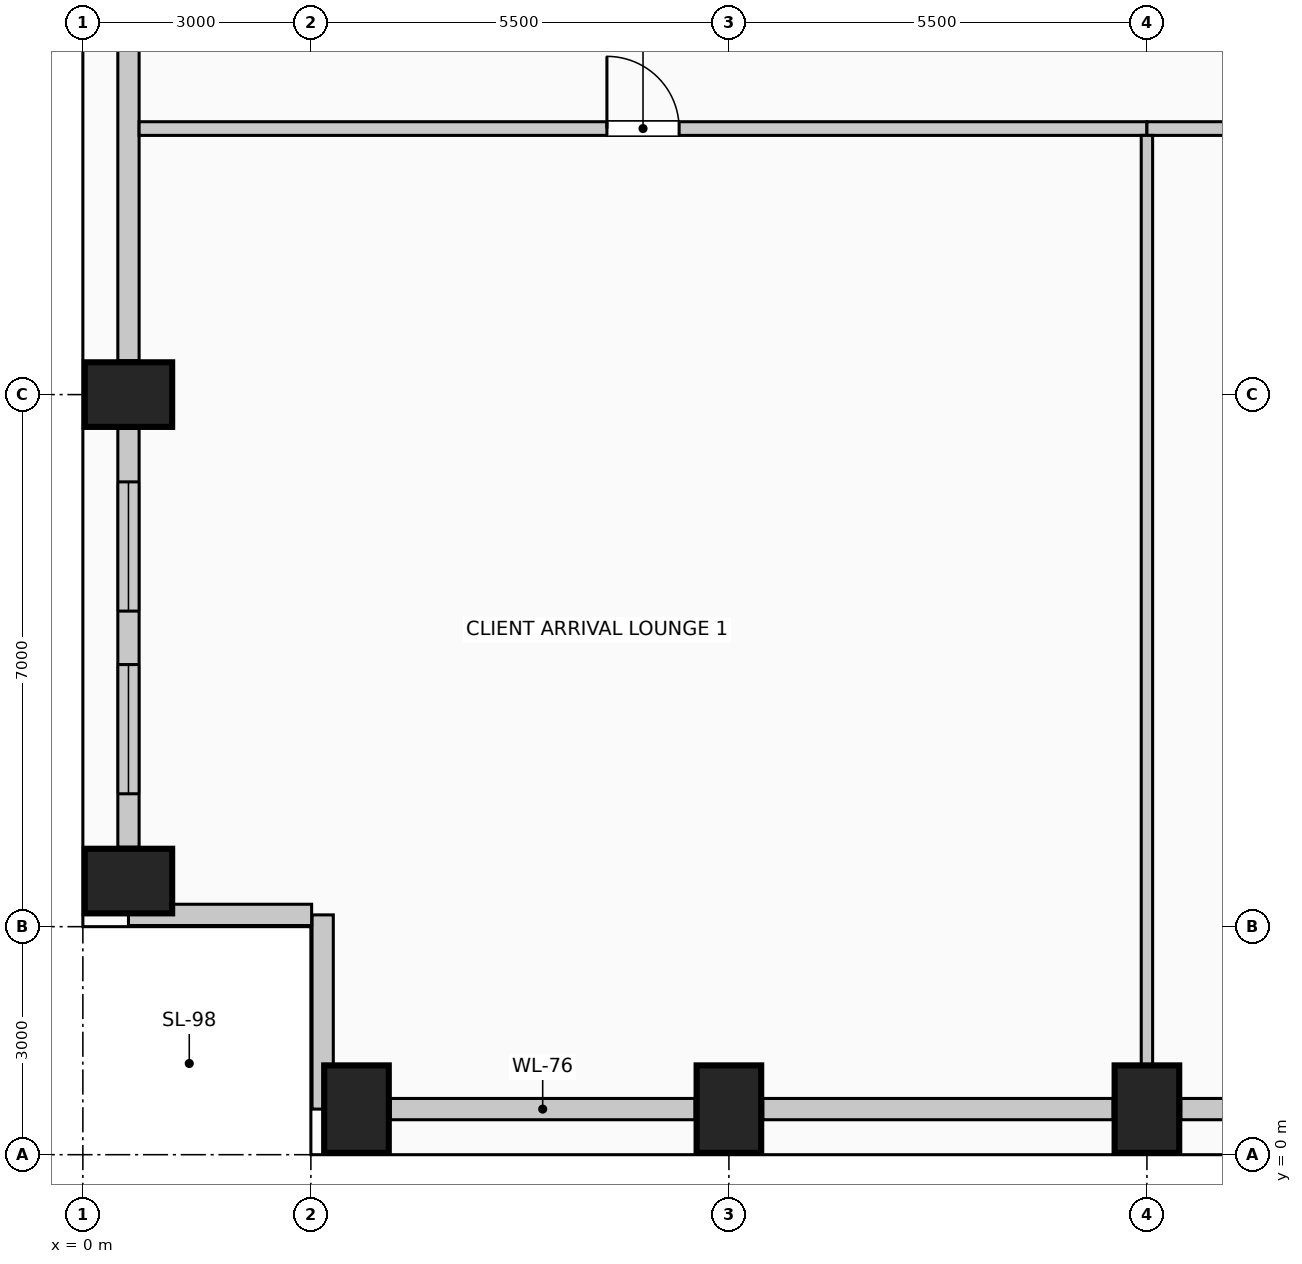
"""IFC4 building model, lengths in metres.
Left out: names, types, materials, properties, quantities, classifications, styles, units other than length and angle.
Written with IfcOpenShell. Run it as: python <this file> out.ifc"""

import sys

from ifc_helpers import new_model, si_unit, direction, frame, frame_2d, origin, origin_2d, place, context, subcontext, project, spatial, rectangle, extrude, element, fill, save


model = new_model("IFC4")
c1 = context("Model", 3, precision=1e-05, world=origin(), true_north=direction((0.0, 1.0)))
c2 = subcontext(c1, "Body", "Model", "MODEL_VIEW")
j1 = project(units=[si_unit("LENGTHUNIT", "METRE"), si_unit("PLANEANGLEUNIT", "RADIAN")], contexts=[c1])
p1 = place(None, origin())
s1 = spatial("IfcSite", under=j1, at=p1, CompositionType="ELEMENT")
p2 = place(p1, origin())
s2 = spatial("IfcBuilding", under=s1, at=p2, CompositionType="ELEMENT")
p3 = place(p2, frame((0.0, 0.0, 112.6)))
s3 = spatial("IfcBuildingStorey", under=s2, at=p3, CompositionType="ELEMENT", Elevation=112.6)
for number, where, z_axis, x_axis in (
    (1, (3.6, 0.6, 0.0), (0.0, 0.0, 1.0), (1.0, 0.0, 0.0)),
    (2, (8.5, 0.6, 0.0), (0.0, 0.0, 1.0), (1.0, 0.0, 0.0)),
    (3, (14.0, 0.6, 0.0), (0.0, 0.0, 1.0), (1.0, 0.0, 0.0)),
    (4, (0.6, 3.6, 0.0), (0.0, 0.0, 1.0), (0.0, 1.0, 0.0)),
    (5, (0.6, 10.0, 0.0), (0.0, 0.0, 1.0), (0.0, 1.0, 0.0)),
):
    element("IfcColumn", number, at=place(p3, frame(where, z_axis=z_axis, x_axis=x_axis)), inside=s3, PredefinedType="COLUMN", context=c2, shape_type="SweptSolid", body=[
        extrude(rectangle(XDim=0.85, YDim=1.15, at=origin_2d()), origin(), (0.0, 0.0, 1.0), 4.0),
    ])
p4 = place(p3, frame((8.055, 0.6, 0.0), z_axis=(0.0, 0.0, 1.0), x_axis=(-1.0, 0.0, 0.0)))
e6 = element("IfcWall", 6, at=p4, inside=s3, PredefinedType="SOLIDWALL", context=c2, shape_type="SweptSolid", body=[
    extrude(rectangle(XDim=4.01, YDim=0.28, at=frame_2d((2.005, 0.0))), origin(), (0.0, 0.0, 1.0), 2.875),
])
p5 = place(p3, frame((13.555, 0.6, 0.0), z_axis=(0.0, 0.0, 1.0), x_axis=(-1.0, 0.0, 0.0)))
e7 = element("IfcWall", 7, at=p5, inside=s3, PredefinedType="SOLIDWALL", context=c2, shape_type="SweptSolid", body=[
    extrude(rectangle(XDim=4.61, YDim=0.28, at=frame_2d((2.305, 0.0))), origin(), (0.0, 0.0, 1.0), 2.875),
])
p6 = place(p3, frame((15.83, 0.6, 0.0), z_axis=(0.0, 0.0, 1.0), x_axis=(-1.0, 0.0, 0.0)))
e8 = element("IfcWall", 8, at=p6, inside=s3, PredefinedType="SOLIDWALL", context=c2, shape_type="SweptSolid", body=[
    extrude(rectangle(XDim=1.385, YDim=0.28, at=frame_2d((0.692, 0.0))), origin(), (0.0, 0.0, 1.0), 2.875),
])
p7 = place(p3, frame((0.6, 4.045, 0.0), z_axis=(0.0, 0.0, 1.0), x_axis=(0.0, 1.0, 0.0)))
e9 = element("IfcWall", 9, at=p7, inside=s3, PredefinedType="SOLIDWALL", context=c2, shape_type="SweptSolid", body=[
    extrude(rectangle(XDim=5.51, YDim=0.28, at=frame_2d((2.755, 0.0))), origin(), (0.0, 0.0, 1.0), 2.875),
])
p8 = place(p7, frame((0.703, 0.0, 0.5)))
e10 = element("IfcOpeningElement", 10, at=p8, cuts=e9, PredefinedType="OPENING", context=c2, shape_type="SweptSolid", body=[
    extrude(rectangle(XDim=1.7, YDim=1.95, at=frame_2d((0.85, 0.975))), frame((0.0, 0.15, 0.0), z_axis=(0.0, -1.0, 0.0), x_axis=(1.0, 0.0, 0.0)), (0.0, 0.0, 1.0), 0.3),
])
p9 = place(p7, frame((3.107, 0.0, 0.5)))
e11 = element("IfcOpeningElement", 11, at=p9, cuts=e9, PredefinedType="OPENING", context=c2, shape_type="SweptSolid", body=[
    extrude(rectangle(XDim=1.7, YDim=1.95, at=frame_2d((0.85, 0.975))), frame((0.0, 0.15, 0.0), z_axis=(0.0, -1.0, 0.0), x_axis=(1.0, 0.0, 0.0)), (0.0, 0.0, 1.0), 0.3),
])
p10 = place(p3, frame((0.6, 10.445, 0.0), z_axis=(0.0, 0.0, 1.0), x_axis=(0.0, 1.0, 0.0)))
e12 = element("IfcWall", 12, at=p10, inside=s3, PredefinedType="SOLIDWALL", context=c2, shape_type="SweptSolid", body=[
    extrude(rectangle(XDim=7.11, YDim=0.28, at=frame_2d((3.555, 0.0))), origin(), (0.0, 0.0, 1.0), 2.875),
])
p11 = place(p3, frame((3.155, 0.6, 0.0), z_axis=(0.0, 0.0, 1.0), x_axis=(0.0, 1.0, 0.0)))
e13 = element("IfcWall", 13, at=p11, inside=s3, PredefinedType="SOLIDWALL", context=c2, shape_type="SweptSolid", body=[
    extrude(rectangle(XDim=2.555, YDim=0.28, at=frame_2d((1.277, 0.0))), origin(), (0.0, 0.0, 1.0), 3.725),
])
p12 = place(p3, frame((3.01, 3.155, 0.0), z_axis=(0.0, 0.0, 1.0), x_axis=(-1.0, 0.0, 0.0)))
e14 = element("IfcWall", 14, at=p12, inside=s3, PredefinedType="SOLIDWALL", context=c2, shape_type="SweptSolid", body=[
    extrude(rectangle(XDim=2.41, YDim=0.28, at=frame_2d((1.205, 0.0))), origin(), (0.0, 0.0, 1.0), 3.725),
])
p13 = place(p3, frame((0.74, 13.5, 0.0), z_axis=(0.0, 0.0, 1.0), x_axis=(1.0, 0.0, 0.0)))
e15 = element("IfcWall", 15, at=p13, inside=s3, PredefinedType="PARTITIONING", context=c2, shape_type="SweptSolid", body=[
    extrude(rectangle(XDim=13.26, YDim=0.18, at=frame_2d((6.63, 0.0))), origin(), (0.0, 0.0, 1.0), 3.725),
])
p14 = place(p13, frame((6.155, 0.0, 0.0)))
e16 = element("IfcOpeningElement", 16, at=p14, cuts=e15, PredefinedType="OPENING", context=c2, shape_type="SweptSolid", body=[
    extrude(rectangle(XDim=0.95, YDim=2.15, at=frame_2d((0.475, 1.075))), frame((0.0, 0.1, 0.0), z_axis=(0.0, -1.0, 0.0), x_axis=(1.0, 0.0, 0.0)), (0.0, 0.0, 1.0), 0.2),
])
p15 = place(p3, frame((14.0, 13.5, 0.0), z_axis=(0.0, 0.0, 1.0), x_axis=(1.0, 0.0, 0.0)))
e17 = element("IfcWall", 17, at=p15, inside=s3, PredefinedType="PARTITIONING", context=c2, shape_type="SweptSolid", body=[
    extrude(rectangle(XDim=12.12, YDim=0.18, at=frame_2d((6.06, 0.0))), origin(), (0.0, 0.0, 1.0), 3.725),
])
p16 = place(p15, frame((5.535, 0.0, 0.0)))
e18 = element("IfcOpeningElement", 18, at=p16, cuts=e17, PredefinedType="OPENING", context=c2, shape_type="SweptSolid", body=[
    extrude(rectangle(XDim=1.05, YDim=2.15, at=frame_2d((0.525, 1.075))), frame((0.0, 0.1, 0.0), z_axis=(0.0, -1.0, 0.0), x_axis=(1.0, 0.0, 0.0)), (0.0, 0.0, 1.0), 0.2),
])
p17 = place(p3, frame((14.0, 1.175, 0.0), z_axis=(0.0, 0.0, 1.0), x_axis=(0.0, 1.0, 0.0)))
e19 = element("IfcWall", 19, at=p17, inside=s3, PredefinedType="PARTITIONING", context=c2, shape_type="SweptSolid", body=[
    extrude(rectangle(XDim=12.235, YDim=0.15, at=frame_2d((6.117, 0.0))), origin(), (0.0, 0.0, 1.0), 3.725),
])
p18 = place(p8, origin())
e20 = element("IfcWindow", 20, at=p18, inside=s3, PartitioningType="SINGLE_PANEL", PredefinedType="WINDOW", context=c2, shape_type="SweptSolid", body=[
    extrude(rectangle(XDim=1.7, YDim=1.95, at=frame_2d((0.85, 0.975))), frame((0.0, 0.03, 0.0), z_axis=(0.0, -1.0, 0.0), x_axis=(1.0, 0.0, 0.0)), (0.0, 0.0, 1.0), 0.06),
])
fill(e10, e20)
p19 = place(p9, origin())
e21 = element("IfcWindow", 21, at=p19, inside=s3, PartitioningType="SINGLE_PANEL", PredefinedType="WINDOW", context=c2, shape_type="SweptSolid", body=[
    extrude(rectangle(XDim=1.7, YDim=1.95, at=frame_2d((0.85, 0.975))), frame((0.0, 0.03, 0.0), z_axis=(0.0, -1.0, 0.0), x_axis=(1.0, 0.0, 0.0)), (0.0, 0.0, 1.0), 0.06),
])
fill(e11, e21)
p20 = place(p14, origin())
e22 = element("IfcDoor", 22, at=p20, inside=s3, OperationType="SINGLE_SWING_LEFT", PredefinedType="DOOR", context=c2, shape_type="SweptSolid", body=[
    extrude(rectangle(XDim=0.95, YDim=2.15, at=frame_2d((0.475, 1.075))), frame((0.0, 0.025, 0.0), z_axis=(0.0, -1.0, 0.0), x_axis=(1.0, 0.0, 0.0)), (0.0, 0.0, 1.0), 0.05),
])
fill(e16, e22)
save(model, sys.argv[1])
